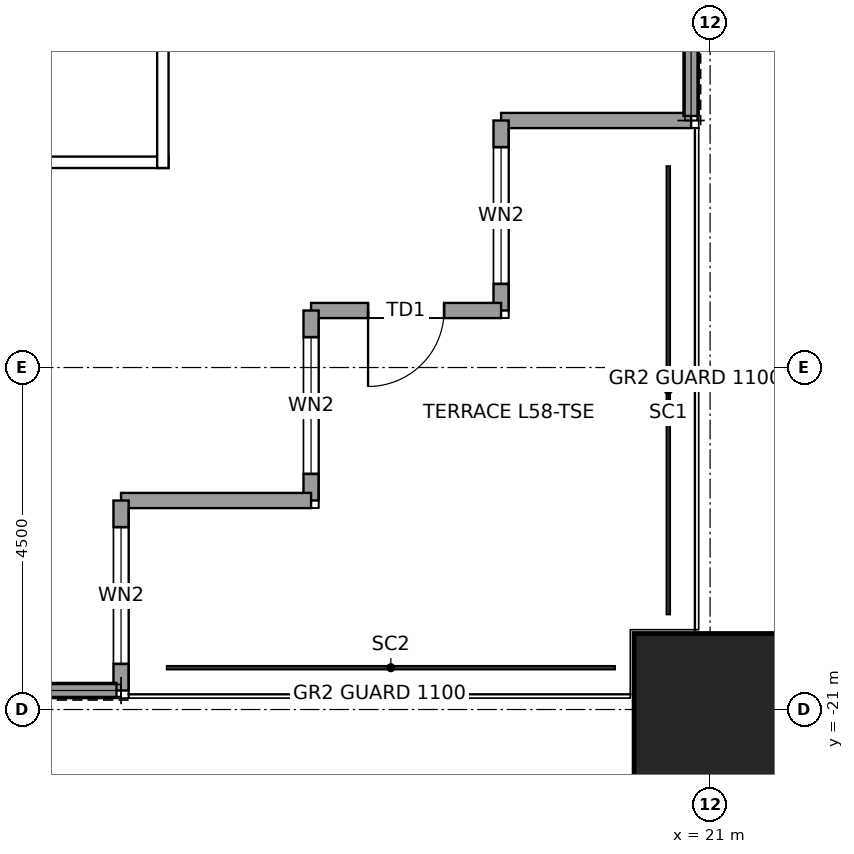
"""IFC4 building model, lengths in metres.
Left out: names, types, materials, properties, quantities, classifications, styles, units other than length and angle.
Written with IfcOpenShell. Run it as: python <this file> out.ifc"""

import sys

from ifc_helpers import new_model, si_unit, direction, frame, frame_2d, origin, origin_2d, place, context, subcontext, project, spatial, rectangle, hollow_rectangle, extrude, element, fill, save


model = new_model("IFC4")
c1 = context("Model", 3, precision=1e-05, world=origin(), true_north=direction((0.0, 1.0)))
c2 = subcontext(c1, "Body", "Model", "MODEL_VIEW")
j1 = project(units=[si_unit("LENGTHUNIT", "METRE"), si_unit("PLANEANGLEUNIT", "RADIAN")], contexts=[c1])
p1 = place(None, origin())
s1 = spatial("IfcSite", under=j1, at=p1, CompositionType="ELEMENT")
p2 = place(p1, origin())
s2 = spatial("IfcBuilding", under=s1, at=p2, CompositionType="ELEMENT")
p3 = place(p2, frame((0.0, 0.0, 267.9)))
s3 = spatial("IfcBuildingStorey", under=s2, at=p3, CompositionType="ELEMENT", Elevation=267.9)
p4 = place(p3, frame((21.0, -21.0, 0.0), z_axis=(0.0, 0.0, 1.0), x_axis=(1.0, 0.0, 0.0)))
e1 = element("IfcColumn", 1, at=p4, inside=s3, PredefinedType="COLUMN", context=c2, shape_type="SweptSolid", body=[
    extrude(hollow_rectangle(XDim=2.0, YDim=2.0, WallThickness=0.095, at=origin_2d()), origin(), (0.0, 0.0, 1.0), 4.0),
])
p5 = place(p3, frame((20.75, -13.25, 0.0), z_axis=(0.0, 0.0, 1.0), x_axis=(-1.0, 0.0, 0.0)))
e2 = element("IfcWall", 2, at=p5, inside=s3, PredefinedType="SOLIDWALL", context=c2, shape_type="SweptSolid", body=[
    extrude(rectangle(XDim=2.5, YDim=0.2, at=frame_2d((1.25, 0.0))), origin(), (0.0, 0.0, 1.0), 3.85),
])
p6 = place(p3, frame((18.25, -13.25, 0.0), z_axis=(0.0, 0.0, 1.0), x_axis=(0.0, -1.0, 0.0)))
e3 = element("IfcWall", 3, at=p6, inside=s3, PredefinedType="SOLIDWALL", context=c2, shape_type="SweptSolid", body=[
    extrude(rectangle(XDim=2.5, YDim=0.2, at=frame_2d((1.25, 0.0))), origin(), (0.0, 0.0, 1.0), 3.85),
])
p7 = place(p6, frame((0.35, 0.0, 0.3)))
e4 = element("IfcOpeningElement", 4, at=p7, cuts=e3, PredefinedType="OPENING", context=c2, shape_type="SweptSolid", body=[
    extrude(rectangle(XDim=1.8, YDim=2.4, at=frame_2d((0.9, 1.2))), frame((0.0, 0.11, 0.0), z_axis=(0.0, -1.0, 0.0), x_axis=(1.0, 0.0, 0.0)), (0.0, 0.0, 1.0), 0.22),
])
p8 = place(p3, frame((18.25, -15.75, 0.0), z_axis=(0.0, 0.0, 1.0), x_axis=(-1.0, 0.0, 0.0)))
e5 = element("IfcWall", 5, at=p8, inside=s3, PredefinedType="SOLIDWALL", context=c2, shape_type="SweptSolid", body=[
    extrude(rectangle(XDim=2.5, YDim=0.2, at=frame_2d((1.25, 0.0))), origin(), (0.0, 0.0, 1.0), 3.317),
])
p9 = place(p8, frame((0.75, 0.0, 0.0)))
e6 = element("IfcOpeningElement", 6, at=p9, cuts=e5, PredefinedType="OPENING", context=c2, shape_type="SweptSolid", body=[
    extrude(rectangle(XDim=1.0, YDim=2.4, at=frame_2d((0.5, 1.2))), frame((0.0, 0.11, 0.0), z_axis=(0.0, -1.0, 0.0), x_axis=(1.0, 0.0, 0.0)), (0.0, 0.0, 1.0), 0.22),
])
p10 = place(p3, frame((15.75, -15.75, 0.0), z_axis=(0.0, 0.0, 1.0), x_axis=(0.0, -1.0, 0.0)))
e7 = element("IfcWall", 7, at=p10, inside=s3, PredefinedType="SOLIDWALL", context=c2, shape_type="SweptSolid", body=[
    extrude(rectangle(XDim=2.5, YDim=0.2, at=frame_2d((1.25, 0.0))), origin(), (0.0, 0.0, 1.0), 3.85),
])
p11 = place(p10, frame((0.35, 0.0, 0.3)))
e8 = element("IfcOpeningElement", 8, at=p11, cuts=e7, PredefinedType="OPENING", context=c2, shape_type="SweptSolid", body=[
    extrude(rectangle(XDim=1.8, YDim=2.4, at=frame_2d((0.9, 1.2))), frame((0.0, 0.11, 0.0), z_axis=(0.0, -1.0, 0.0), x_axis=(1.0, 0.0, 0.0)), (0.0, 0.0, 1.0), 0.22),
])
p12 = place(p3, frame((15.75, -18.25, 0.0), z_axis=(0.0, 0.0, 1.0), x_axis=(-1.0, 0.0, 0.0)))
e9 = element("IfcWall", 9, at=p12, inside=s3, PredefinedType="SOLIDWALL", context=c2, shape_type="SweptSolid", body=[
    extrude(rectangle(XDim=2.5, YDim=0.2, at=frame_2d((1.25, 0.0))), origin(), (0.0, 0.0, 1.0), 3.85),
])
p13 = place(p3, frame((13.25, -18.25, 0.0), z_axis=(0.0, 0.0, 1.0), x_axis=(0.0, -1.0, 0.0)))
e10 = element("IfcWall", 10, at=p13, inside=s3, PredefinedType="SOLIDWALL", context=c2, shape_type="SweptSolid", body=[
    extrude(rectangle(XDim=2.5, YDim=0.2, at=frame_2d((1.25, 0.0))), origin(), (0.0, 0.0, 1.0), 3.85),
])
p14 = place(p13, frame((0.35, 0.0, 0.3)))
e11 = element("IfcOpeningElement", 11, at=p14, cuts=e10, PredefinedType="OPENING", context=c2, shape_type="SweptSolid", body=[
    extrude(rectangle(XDim=1.8, YDim=2.4, at=frame_2d((0.9, 1.2))), frame((0.0, 0.11, 0.0), z_axis=(0.0, -1.0, 0.0), x_axis=(1.0, 0.0, 0.0)), (0.0, 0.0, 1.0), 0.22),
])
for number, where, z_axis, x_axis in (
    (12, (20.75, -10.405, 0.0), (0.0, 0.0, 1.0), (0.0, -1.0, 0.0)),
    (13, (13.19, -20.75, 0.0), (0.0, 0.0, 1.0), (-1.0, 0.0, 0.0)),
):
    element("IfcWall", number, at=place(p3, frame(where, z_axis=z_axis, x_axis=x_axis)), inside=s3, PredefinedType="SOLIDWALL", context=c2, shape_type="SweptSolid", body=[
        extrude(rectangle(XDim=2.785, YDim=0.2, at=frame_2d((1.393, 0.0))), origin(), (0.0, 0.0, 1.0), 3.85),
    ])
p15 = place(p3, frame((-13.875, -13.8, 0.0), z_axis=(0.0, 0.0, 1.0), x_axis=(1.0, 0.0, 0.0)))
e14 = element("IfcWall", 14, at=p15, inside=s3, PredefinedType="PARTITIONING", context=c2, shape_type="SweptSolid", body=[
    extrude(rectangle(XDim=27.75, YDim=0.15, at=frame_2d((13.875, 0.0))), origin(), (0.0, 0.0, 1.0), 3.85),
])
p16 = place(p15, frame((3.975, 0.0, 0.0)))
e15 = element("IfcOpeningElement", 15, at=p16, cuts=e14, PredefinedType="OPENING", context=c2, shape_type="SweptSolid", body=[
    extrude(rectangle(XDim=1.0, YDim=2.4, at=frame_2d((0.5, 1.2))), frame((0.0, 0.085, 0.0), z_axis=(0.0, -1.0, 0.0), x_axis=(1.0, 0.0, 0.0)), (0.0, 0.0, 1.0), 0.17),
])
p17 = place(p3, frame((13.8, -13.875, 0.0), z_axis=(0.0, 0.0, 1.0), x_axis=(0.0, 1.0, 0.0)))
e16 = element("IfcWall", 16, at=p17, inside=s3, PredefinedType="PARTITIONING", context=c2, shape_type="SweptSolid", body=[
    extrude(rectangle(XDim=11.45, YDim=0.15, at=frame_2d((5.725, 0.0))), origin(), (0.0, 0.0, 1.0), 3.85),
])
p18 = place(p17, frame((5.225, 0.0, 0.0)))
e17 = element("IfcOpeningElement", 17, at=p18, cuts=e16, PredefinedType="OPENING", context=c2, shape_type="SweptSolid", body=[
    extrude(rectangle(XDim=1.0, YDim=2.4, at=frame_2d((0.5, 1.2))), frame((0.0, 0.085, 0.0), z_axis=(0.0, -1.0, 0.0), x_axis=(1.0, 0.0, 0.0)), (0.0, 0.0, 1.0), 0.17),
])
p19 = place(p7, origin())
e18 = element("IfcWindow", 18, at=p19, inside=s3, PartitioningType="SINGLE_PANEL", PredefinedType="WINDOW", context=c2, shape_type="SweptSolid", body=[
    extrude(rectangle(XDim=1.8, YDim=2.4, at=frame_2d((0.9, 1.2))), frame((0.0, 0.03, 0.0), z_axis=(0.0, -1.0, 0.0), x_axis=(1.0, 0.0, 0.0)), (0.0, 0.0, 1.0), 0.06),
])
fill(e4, e18)
p20 = place(p9, origin())
e19 = element("IfcDoor", 19, at=p20, inside=s3, OperationType="SINGLE_SWING_RIGHT", PredefinedType="DOOR", context=c2, shape_type="SweptSolid", body=[
    extrude(rectangle(XDim=1.0, YDim=2.4, at=frame_2d((0.5, 1.2))), frame((0.0, 0.025, 0.0), z_axis=(0.0, -1.0, 0.0), x_axis=(1.0, 0.0, 0.0)), (0.0, 0.0, 1.0), 0.05),
])
fill(e6, e19)
p21 = place(p11, origin())
e20 = element("IfcWindow", 20, at=p21, inside=s3, PartitioningType="SINGLE_PANEL", PredefinedType="WINDOW", context=c2, shape_type="SweptSolid", body=[
    extrude(rectangle(XDim=1.8, YDim=2.4, at=frame_2d((0.9, 1.2))), frame((0.0, 0.03, 0.0), z_axis=(0.0, -1.0, 0.0), x_axis=(1.0, 0.0, 0.0)), (0.0, 0.0, 1.0), 0.06),
])
fill(e8, e20)
p22 = place(p14, origin())
e21 = element("IfcWindow", 21, at=p22, inside=s3, PartitioningType="SINGLE_PANEL", PredefinedType="WINDOW", context=c2, shape_type="SweptSolid", body=[
    extrude(rectangle(XDim=1.8, YDim=2.4, at=frame_2d((0.9, 1.2))), frame((0.0, 0.03, 0.0), z_axis=(0.0, -1.0, 0.0), x_axis=(1.0, 0.0, 0.0)), (0.0, 0.0, 1.0), 0.06),
])
fill(e11, e21)
save(model, sys.argv[1])
